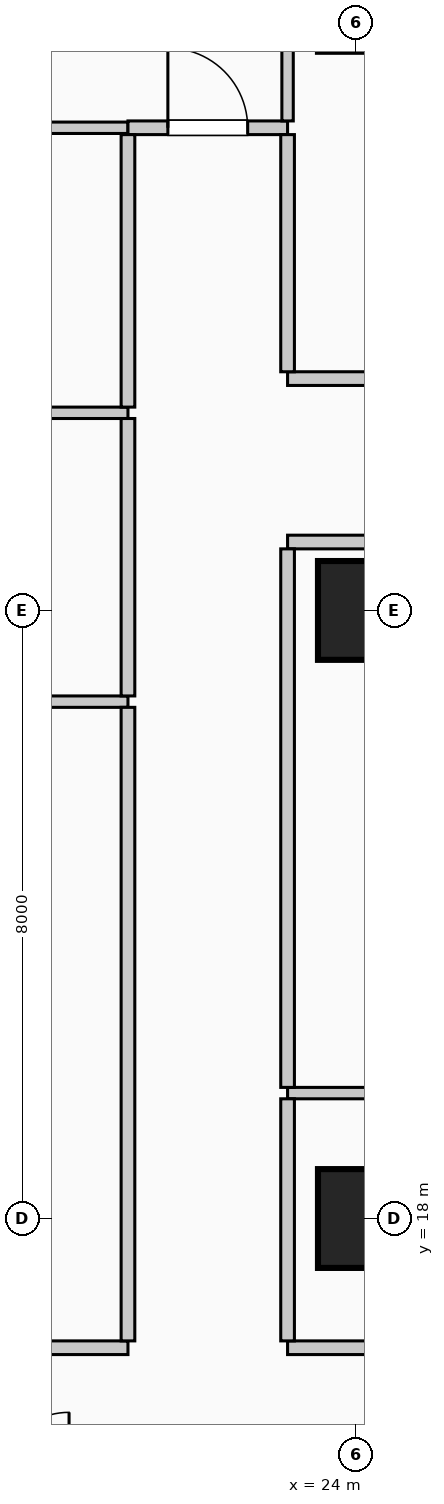
"""IFC4 building model, lengths in metres.
Left out: names, types, materials, properties, quantities, classifications, styles, units other than length and angle.
Written with IfcOpenShell. Run it as: python <this file> out.ifc"""

import sys

from ifc_helpers import new_model, si_unit, direction, frame, frame_2d, origin, origin_2d, place, context, subcontext, project, spatial, rectangle, extrude, element, fill, save


model = new_model("IFC4")
c1 = context("Model", 3, precision=1e-05, world=origin(), true_north=direction((0.0, 1.0)))
c2 = subcontext(c1, "Body", "Model", "MODEL_VIEW")
j1 = project(units=[si_unit("LENGTHUNIT", "METRE"), si_unit("PLANEANGLEUNIT", "RADIAN")], contexts=[c1])
p1 = place(None, origin())
s1 = spatial("IfcSite", under=j1, at=p1, CompositionType="ELEMENT")
p2 = place(p1, origin())
s2 = spatial("IfcBuilding", under=s1, at=p2, CompositionType="ELEMENT")
p3 = place(p2, frame((0.0, 0.0, 202.6)))
s3 = spatial("IfcBuildingStorey", under=s2, at=p3, CompositionType="ELEMENT", Elevation=202.6)
for number, where, z_axis, x_axis in (
    (1, (24.0, 18.0, 0.0), (0.0, 0.0, 1.0), (1.0, 0.0, 0.0)),
    (2, (24.0, 26.0, 0.0), (0.0, 0.0, 1.0), (1.0, 0.0, 0.0)),
    (3, (24.0, 34.0, 0.0), (0.0, 0.0, 1.0), (1.0, 0.0, 0.0)),
):
    element("IfcColumn", number, at=place(p3, frame(where, z_axis=z_axis, x_axis=x_axis)), inside=s3, PredefinedType="COLUMN", context=c2, shape_type="SweptSolid", body=[
        extrude(rectangle(XDim=1.0, YDim=1.3, at=origin_2d()), origin(), (0.0, 0.0, 1.0), 4.0),
    ])
p4 = place(p3, frame((15.85, 16.3, 0.0), z_axis=(0.0, 0.0, 1.0), x_axis=(1.0, 0.0, 0.0)))
e4 = element("IfcWall", 4, at=p4, inside=s3, PredefinedType="PARTITIONING", context=c2, shape_type="SweptSolid", body=[
    extrude(rectangle(XDim=5.15, YDim=0.18, at=frame_2d((2.575, 0.0))), origin(), (0.0, 0.0, 1.0), 3.75),
])
p5 = place(p4, frame((2.1, 0.0, 0.0)))
e5 = element("IfcOpeningElement", 5, at=p5, cuts=e4, PredefinedType="OPENING", context=c2, shape_type="SweptSolid", body=[
    extrude(rectangle(XDim=0.95, YDim=2.15, at=frame_2d((0.475, 1.075))), frame((0.0, 0.1, 0.0), z_axis=(0.0, -1.0, 0.0), x_axis=(1.0, 0.0, 0.0)), (0.0, 0.0, 1.0), 0.2),
])
p6 = place(p3, frame((23.1, 16.3, 0.0), z_axis=(0.0, 0.0, 1.0), x_axis=(1.0, 0.0, 0.0)))
e6 = element("IfcWall", 6, at=p6, inside=s3, PredefinedType="PARTITIONING", context=c2, shape_type="SweptSolid", body=[
    extrude(rectangle(XDim=11.65, YDim=0.18, at=frame_2d((5.825, 0.0))), origin(), (0.0, 0.0, 1.0), 3.75),
])
p7 = place(p3, frame((23.1, 19.65, 0.0), z_axis=(0.0, 0.0, 1.0), x_axis=(1.0, 0.0, 0.0)))
e7 = element("IfcWall", 7, at=p7, inside=s3, PredefinedType="PARTITIONING", context=c2, shape_type="SweptSolid", body=[
    extrude(rectangle(XDim=11.65, YDim=0.15, at=frame_2d((5.825, 0.0))), origin(), (0.0, 0.0, 1.0), 3.75),
])
p8 = place(p3, frame((15.85, 24.8, 0.0), z_axis=(0.0, 0.0, 1.0), x_axis=(1.0, 0.0, 0.0)))
e8 = element("IfcWall", 8, at=p8, inside=s3, PredefinedType="PARTITIONING", context=c2, shape_type="SweptSolid", body=[
    extrude(rectangle(XDim=5.15, YDim=0.15, at=frame_2d((2.575, 0.0))), origin(), (0.0, 0.0, 1.0), 3.75),
])
p9 = place(p3, frame((23.1, 26.9, 0.0), z_axis=(0.0, 0.0, 1.0), x_axis=(1.0, 0.0, 0.0)))
e9 = element("IfcWall", 9, at=p9, inside=s3, PredefinedType="PARTITIONING", context=c2, shape_type="SweptSolid", body=[
    extrude(rectangle(XDim=11.65, YDim=0.18, at=frame_2d((5.825, 0.0))), origin(), (0.0, 0.0, 1.0), 3.75),
])
p10 = place(p9, frame((5.35, 0.0, 0.0)))
e10 = element("IfcOpeningElement", 10, at=p10, cuts=e9, PredefinedType="OPENING", context=c2, shape_type="SweptSolid", body=[
    extrude(rectangle(XDim=0.95, YDim=2.15, at=frame_2d((0.475, 1.075))), frame((0.0, 0.1, 0.0), z_axis=(0.0, -1.0, 0.0), x_axis=(1.0, 0.0, 0.0)), (0.0, 0.0, 1.0), 0.2),
])
p11 = place(p3, frame((12.2, 28.6, 0.0), z_axis=(0.0, 0.0, 1.0), x_axis=(1.0, 0.0, 0.0)))
e11 = element("IfcWall", 11, at=p11, inside=s3, PredefinedType="PARTITIONING", context=c2, shape_type="SweptSolid", body=[
    extrude(rectangle(XDim=8.8, YDim=0.15, at=frame_2d((4.4, 0.0))), origin(), (0.0, 0.0, 1.0), 3.75),
])
p12 = place(p3, frame((23.1, 29.05, 0.0), z_axis=(0.0, 0.0, 1.0), x_axis=(1.0, 0.0, 0.0)))
e12 = element("IfcWall", 12, at=p12, inside=s3, PredefinedType="PARTITIONING", context=c2, shape_type="SweptSolid", body=[
    extrude(rectangle(XDim=11.12, YDim=0.18, at=frame_2d((5.56, 0.0))), origin(), (0.0, 0.0, 1.0), 3.75),
])
p13 = place(p12, frame((5.035, 0.0, 0.0)))
e13 = element("IfcOpeningElement", 13, at=p13, cuts=e12, PredefinedType="OPENING", context=c2, shape_type="SweptSolid", body=[
    extrude(rectangle(XDim=1.05, YDim=2.15, at=frame_2d((0.525, 1.075))), frame((0.0, 0.1, 0.0), z_axis=(0.0, -1.0, 0.0), x_axis=(1.0, 0.0, 0.0)), (0.0, 0.0, 1.0), 0.2),
])
p14 = place(p3, frame((16.75, 32.35, 0.0), z_axis=(0.0, 0.0, 1.0), x_axis=(1.0, 0.0, 0.0)))
e14 = element("IfcWall", 14, at=p14, inside=s3, PredefinedType="PARTITIONING", context=c2, shape_type="SweptSolid", body=[
    extrude(rectangle(XDim=4.25, YDim=0.15, at=frame_2d((2.125, 0.0))), origin(), (0.0, 0.0, 1.0), 3.75),
])
p15 = place(p3, frame((21.0, 32.35, 0.0), z_axis=(0.0, 0.0, 1.0), x_axis=(1.0, 0.0, 0.0)))
e15 = element("IfcWall", 15, at=p15, inside=s3, PredefinedType="PARTITIONING", context=c2, shape_type="SweptSolid", body=[
    extrude(rectangle(XDim=2.1, YDim=0.18, at=frame_2d((1.05, 0.0))), origin(), (0.0, 0.0, 1.0), 3.75),
])
p16 = place(p15, frame((0.525, 0.0, 0.0)))
e16 = element("IfcOpeningElement", 16, at=p16, cuts=e15, PredefinedType="OPENING", context=c2, shape_type="SweptSolid", body=[
    extrude(rectangle(XDim=1.05, YDim=2.15, at=frame_2d((0.525, 1.075))), frame((0.0, 0.1, 0.0), z_axis=(0.0, -1.0, 0.0), x_axis=(1.0, 0.0, 0.0)), (0.0, 0.0, 1.0), 0.2),
])
p17 = place(p3, frame((21.0, 16.39, 0.0), z_axis=(0.0, 0.0, 1.0), x_axis=(0.0, 1.0, 0.0)))
e17 = element("IfcWall", 17, at=p17, inside=s3, PredefinedType="PARTITIONING", context=c2, shape_type="SweptSolid", body=[
    extrude(rectangle(XDim=8.335, YDim=0.18, at=frame_2d((4.167, 0.0))), origin(), (0.0, 0.0, 1.0), 3.75),
])
p18 = place(p3, frame((21.0, 24.875, 0.0), z_axis=(0.0, 0.0, 1.0), x_axis=(0.0, 1.0, 0.0)))
e18 = element("IfcWall", 18, at=p18, inside=s3, PredefinedType="PARTITIONING", context=c2, shape_type="SweptSolid", body=[
    extrude(rectangle(XDim=3.65, YDim=0.18, at=frame_2d((1.825, 0.0))), origin(), (0.0, 0.0, 1.0), 3.75),
])
p19 = place(p3, frame((21.0, 28.675, 0.0), z_axis=(0.0, 0.0, 1.0), x_axis=(0.0, 1.0, 0.0)))
e19 = element("IfcWall", 19, at=p19, inside=s3, PredefinedType="PARTITIONING", context=c2, shape_type="SweptSolid", body=[
    extrude(rectangle(XDim=3.585, YDim=0.18, at=frame_2d((1.792, 0.0))), origin(), (0.0, 0.0, 1.0), 3.75),
])
p20 = place(p3, frame((23.1, 16.39, 0.0), z_axis=(0.0, 0.0, 1.0), x_axis=(0.0, 1.0, 0.0)))
e20 = element("IfcWall", 20, at=p20, inside=s3, PredefinedType="PARTITIONING", context=c2, shape_type="SweptSolid", body=[
    extrude(rectangle(XDim=3.185, YDim=0.18, at=frame_2d((1.593, 0.0))), origin(), (0.0, 0.0, 1.0), 3.75),
])
p21 = place(p3, frame((23.1, 19.725, 0.0), z_axis=(0.0, 0.0, 1.0), x_axis=(0.0, 1.0, 0.0)))
e21 = element("IfcWall", 21, at=p21, inside=s3, PredefinedType="PARTITIONING", context=c2, shape_type="SweptSolid", body=[
    extrude(rectangle(XDim=7.085, YDim=0.18, at=frame_2d((3.542, 0.0))), origin(), (0.0, 0.0, 1.0), 3.75),
])
p22 = place(p3, frame((23.1, 29.14, 0.0), z_axis=(0.0, 0.0, 1.0), x_axis=(0.0, 1.0, 0.0)))
e22 = element("IfcWall", 22, at=p22, inside=s3, PredefinedType="PARTITIONING", context=c2, shape_type="SweptSolid", body=[
    extrude(rectangle(XDim=3.12, YDim=0.18, at=frame_2d((1.56, 0.0))), origin(), (0.0, 0.0, 1.0), 3.75),
])
p23 = place(p3, frame((23.1, 32.44, 0.0), z_axis=(0.0, 0.0, 1.0), x_axis=(0.0, 1.0, 0.0)))
e23 = element("IfcWall", 23, at=p23, inside=s3, PredefinedType="PARTITIONING", context=c2, shape_type="SweptSolid", body=[
    extrude(rectangle(XDim=12.84, YDim=0.15, at=frame_2d((6.42, 0.0))), origin(), (0.0, 0.0, 1.0), 3.75),
])
p24 = place(p16, origin())
e24 = element("IfcDoor", 24, at=p24, inside=s3, OperationType="SINGLE_SWING_LEFT", PredefinedType="DOOR", context=c2, shape_type="SweptSolid", body=[
    extrude(rectangle(XDim=1.05, YDim=2.15, at=frame_2d((0.525, 1.075))), frame((0.0, 0.025, 0.0), z_axis=(0.0, -1.0, 0.0), x_axis=(1.0, 0.0, 0.0)), (0.0, 0.0, 1.0), 0.05),
])
fill(e16, e24)
save(model, sys.argv[1])
